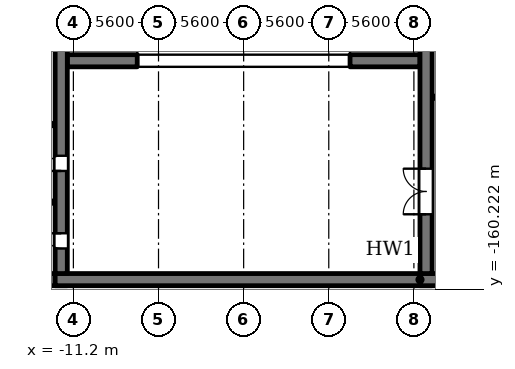
"""IFC4 building model, lengths in metres.
Left out: names, types, materials, properties, quantities, classifications, styles, units other than length and angle.
Written with IfcOpenShell. Run it as: python <this file> out.ifc"""

import sys

from ifc_helpers import new_model, si_unit, direction, frame, frame_2d, origin, place, context, subcontext, project, spatial, rectangle, extrude, element, fill, save


model = new_model("IFC4")
c1 = context("Model", 3, precision=1e-05, world=origin(), true_north=direction((0.0, 1.0)))
c2 = subcontext(c1, "Body", "Model", "MODEL_VIEW")
j1 = project(units=[si_unit("LENGTHUNIT", "METRE"), si_unit("PLANEANGLEUNIT", "RADIAN")], contexts=[c1])
p1 = place(None, origin())
s1 = spatial("IfcSite", under=j1, at=p1, CompositionType="ELEMENT")
p2 = place(p1, origin())
s2 = spatial("IfcBuilding", under=s1, at=p2, CompositionType="ELEMENT")
p3 = place(p2, origin())
s3 = spatial("IfcBuildingStorey", under=s2, at=p3, CompositionType="ELEMENT", Elevation=0.0)
p4 = place(p3, frame((-23.025, -159.6, 0.0), z_axis=(0.0, 0.0, 1.0), x_axis=(1.0, 0.0, 0.0)))
e1 = element("IfcWall", 1, at=p4, inside=s3, PredefinedType="SOLIDWALL", context=c2, shape_type="SweptSolid", body=[
    extrude(rectangle(XDim=11.425, YDim=0.8, at=frame_2d((5.712, 0.0))), origin(), (0.0, 0.0, 1.0), 6.15),
])
p5 = place(p4, frame((1.675, 0.0, 0.9)))
e2 = element("IfcOpeningElement", 2, at=p5, cuts=e1, PredefinedType="OPENING", context=c2, shape_type="SweptSolid", body=[
    extrude(rectangle(XDim=1.8, YDim=1.5, at=frame_2d((0.9, 0.75))), frame((0.0, 0.41, 0.0), z_axis=(0.0, -1.0, 0.0), x_axis=(1.0, 0.0, 0.0)), (0.0, 0.0, 1.0), 0.82),
])
p6 = place(p4, frame((4.675, 0.0, 0.9)))
e3 = element("IfcOpeningElement", 3, at=p6, cuts=e1, PredefinedType="OPENING", context=c2, shape_type="SweptSolid", body=[
    extrude(rectangle(XDim=1.8, YDim=1.5, at=frame_2d((0.9, 0.75))), frame((0.0, 0.41, 0.0), z_axis=(0.0, -1.0, 0.0), x_axis=(1.0, 0.0, 0.0)), (0.0, 0.0, 1.0), 0.82),
])
p7 = place(p4, frame((7.675, 0.0, 0.9)))
e4 = element("IfcOpeningElement", 4, at=p7, cuts=e1, PredefinedType="OPENING", context=c2, shape_type="SweptSolid", body=[
    extrude(rectangle(XDim=1.8, YDim=1.5, at=frame_2d((0.9, 0.75))), frame((0.0, 0.41, 0.0), z_axis=(0.0, -1.0, 0.0), x_axis=(1.0, 0.0, 0.0)), (0.0, 0.0, 1.0), 0.82),
])
p8 = place(p3, frame((-12.4, -159.6, 0.0), z_axis=(0.0, 0.0, 1.0), x_axis=(1.0, 0.0, 0.0)))
e5 = element("IfcWall", 5, at=p8, inside=s3, PredefinedType="SOLIDWALL", context=c2, shape_type="SweptSolid", body=[
    extrude(rectangle(XDim=24.8, YDim=0.8, at=frame_2d((12.4, 0.0))), origin(), (0.0, 0.0, 1.0), 6.5),
])
p9 = place(p3, frame((11.6, -159.6, 0.0), z_axis=(0.0, 0.0, 1.0), x_axis=(1.0, 0.0, 0.0)))
e6 = element("IfcWall", 6, at=p9, inside=s3, PredefinedType="SOLIDWALL", context=c2, shape_type="SweptSolid", body=[
    extrude(rectangle(XDim=18.4, YDim=0.8, at=frame_2d((9.2, 0.0))), origin(), (0.0, 0.0, 1.0), 6.15),
])
p10 = place(p9, frame((6.4, 0.0, 0.0)))
e7 = element("IfcOpeningElement", 7, at=p10, cuts=e6, PredefinedType="OPENING", context=c2, shape_type="SweptSolid", body=[
    extrude(rectangle(XDim=4.0, YDim=4.5, at=frame_2d((2.0, 2.25))), frame((0.0, 0.41, 0.0), z_axis=(0.0, -1.0, 0.0), x_axis=(1.0, 0.0, 0.0)), (0.0, 0.0, 1.0), 0.82),
])
for number, where, z_axis, x_axis in (
    (8, (-22.775, -154.5, 0.0), (0.0, 0.0, 1.0), (1.0, 0.0, 0.0)),
    (9, (-22.775, -149.4, 0.0), (0.0, 0.0, 1.0), (1.0, 0.0, 0.0)),
):
    element("IfcWall", number, at=place(p3, frame(where, z_axis=z_axis, x_axis=x_axis)), inside=s3, PredefinedType="PARTITIONING", context=c2, shape_type="SweptSolid", body=[
        extrude(rectangle(XDim=10.375, YDim=0.15, at=frame_2d((5.188, 0.0))), origin(), (0.0, 0.0, 1.0), 6.15),
    ])
p11 = place(p3, frame((12.4, -147.6, 0.0), z_axis=(0.0, 0.0, 1.0), x_axis=(1.0, 0.0, 0.0)))
e10 = element("IfcWall", 10, at=p11, inside=s3, PredefinedType="PARTITIONING", context=c2, shape_type="SweptSolid", body=[
    extrude(rectangle(XDim=13.35, YDim=0.15, at=frame_2d((6.675, 0.0))), origin(), (0.0, 0.0, 1.0), 6.15),
])
p12 = place(p11, frame((5.1, 0.0, 0.0)))
e11 = element("IfcOpeningElement", 11, at=p12, cuts=e10, PredefinedType="OPENING", context=c2, shape_type="SweptSolid", body=[
    extrude(rectangle(XDim=1.0, YDim=2.1, at=frame_2d((0.5, 1.05))), frame((0.0, 0.085, 0.0), z_axis=(0.0, -1.0, 0.0), x_axis=(1.0, 0.0, 0.0)), (0.0, 0.0, 1.0), 0.17),
])
for number, where, z_axis, x_axis in (
    (12, (-11.6, -145.2, 0.0), (0.0, 0.0, 1.0), (1.0, 0.0, 0.0)),
    (13, (7.0, -145.2, 0.0), (0.0, 0.0, 1.0), (1.0, 0.0, 0.0)),
):
    element("IfcWall", number, at=place(p3, frame(where, z_axis=z_axis, x_axis=x_axis)), inside=s3, PredefinedType="SOLIDWALL", context=c2, shape_type="SweptSolid", body=[
        extrude(rectangle(XDim=4.6, YDim=0.8, at=frame_2d((2.3, 0.0))), origin(), (0.0, 0.0, 1.0), 6.5),
    ])
p13 = place(p3, frame((-12.0, -159.2, 0.0), z_axis=(0.0, 0.0, 1.0), x_axis=(0.0, 1.0, 0.0)))
e14 = element("IfcWall", 14, at=p13, inside=s3, PredefinedType="SOLIDWALL", context=c2, shape_type="SweptSolid", body=[
    extrude(rectangle(XDim=34.125, YDim=0.8, at=frame_2d((17.062, 0.0))), origin(), (0.0, 0.0, 1.0), 6.5),
])
p14 = place(p13, frame((21.6, 0.0, 0.0)))
e15 = element("IfcOpeningElement", 15, at=p14, cuts=e14, PredefinedType="OPENING", context=c2, shape_type="SweptSolid", body=[
    extrude(rectangle(XDim=1.8, YDim=2.2, at=frame_2d((0.9, 1.1))), frame((0.0, 0.41, 0.0), z_axis=(0.0, -1.0, 0.0), x_axis=(1.0, 0.0, 0.0)), (0.0, 0.0, 1.0), 0.82),
])
p15 = place(p13, frame((25.1, 0.0, 0.0)))
e16 = element("IfcOpeningElement", 16, at=p15, cuts=e14, PredefinedType="OPENING", context=c2, shape_type="SweptSolid", body=[
    extrude(rectangle(XDim=1.8, YDim=2.2, at=frame_2d((0.9, 1.1))), frame((0.0, 0.41, 0.0), z_axis=(0.0, -1.0, 0.0), x_axis=(1.0, 0.0, 0.0)), (0.0, 0.0, 1.0), 0.82),
])
p16 = place(p13, frame((6.75, 0.0, 0.0)))
e17 = element("IfcOpeningElement", 17, at=p16, cuts=e14, PredefinedType="OPENING", context=c2, shape_type="SweptSolid", body=[
    extrude(rectangle(XDim=1.0, YDim=2.1, at=frame_2d((0.5, 1.05))), frame((0.0, 0.41, 0.0), z_axis=(0.0, -1.0, 0.0), x_axis=(1.0, 0.0, 0.0)), (0.0, 0.0, 1.0), 0.82),
])
p17 = place(p13, frame((1.65, 0.0, 0.0)))
e18 = element("IfcOpeningElement", 18, at=p17, cuts=e14, PredefinedType="OPENING", context=c2, shape_type="SweptSolid", body=[
    extrude(rectangle(XDim=1.0, YDim=2.1, at=frame_2d((0.5, 1.05))), frame((0.0, 0.41, 0.0), z_axis=(0.0, -1.0, 0.0), x_axis=(1.0, 0.0, 0.0)), (0.0, 0.0, 1.0), 0.82),
])
p18 = place(p3, frame((12.0, -159.2, 0.0), z_axis=(0.0, 0.0, 1.0), x_axis=(0.0, 1.0, 0.0)))
e19 = element("IfcWall", 19, at=p18, inside=s3, PredefinedType="SOLIDWALL", context=c2, shape_type="SweptSolid", body=[
    extrude(rectangle(XDim=34.125, YDim=0.8, at=frame_2d((17.062, 0.0))), origin(), (0.0, 0.0, 1.0), 6.5),
])
p19 = place(p18, frame((21.6, 0.0, 0.0)))
e20 = element("IfcOpeningElement", 20, at=p19, cuts=e19, PredefinedType="OPENING", context=c2, shape_type="SweptSolid", body=[
    extrude(rectangle(XDim=1.8, YDim=2.2, at=frame_2d((0.9, 1.1))), frame((0.0, 0.41, 0.0), z_axis=(0.0, -1.0, 0.0), x_axis=(1.0, 0.0, 0.0)), (0.0, 0.0, 1.0), 0.82),
])
p20 = place(p18, frame((25.1, 0.0, 0.0)))
e21 = element("IfcOpeningElement", 21, at=p20, cuts=e19, PredefinedType="OPENING", context=c2, shape_type="SweptSolid", body=[
    extrude(rectangle(XDim=1.8, YDim=2.2, at=frame_2d((0.9, 1.1))), frame((0.0, 0.41, 0.0), z_axis=(0.0, -1.0, 0.0), x_axis=(1.0, 0.0, 0.0)), (0.0, 0.0, 1.0), 0.82),
])
p21 = place(p18, frame((3.9, 0.0, 0.0)))
e22 = element("IfcOpeningElement", 22, at=p21, cuts=e19, PredefinedType="OPENING", context=c2, shape_type="SweptSolid", body=[
    extrude(rectangle(XDim=3.0, YDim=3.0, at=frame_2d((1.5, 1.5))), frame((0.0, 0.41, 0.0), z_axis=(0.0, -1.0, 0.0), x_axis=(1.0, 0.0, 0.0)), (0.0, 0.0, 1.0), 0.82),
])
p22 = place(p16, origin())
e23 = element("IfcDoor", 23, at=p22, inside=s3, OperationType="SINGLE_SWING_LEFT", PredefinedType="DOOR", context=c2, shape_type="SweptSolid", body=[
    extrude(rectangle(XDim=1.0, YDim=2.1, at=frame_2d((0.5, 1.05))), frame((0.0, 0.025, 0.0), z_axis=(0.0, -1.0, 0.0), x_axis=(1.0, 0.0, 0.0)), (0.0, 0.0, 1.0), 0.05),
])
fill(e17, e23)
p23 = place(p17, origin())
e24 = element("IfcDoor", 24, at=p23, inside=s3, OperationType="SINGLE_SWING_RIGHT", PredefinedType="DOOR", context=c2, shape_type="SweptSolid", body=[
    extrude(rectangle(XDim=1.0, YDim=2.1, at=frame_2d((0.5, 1.05))), frame((0.0, 0.025, 0.0), z_axis=(0.0, -1.0, 0.0), x_axis=(1.0, 0.0, 0.0)), (0.0, 0.0, 1.0), 0.05),
])
fill(e18, e24)
p24 = place(p21, origin())
e25 = element("IfcDoor", 25, at=p24, inside=s3, OperationType="DOUBLE_DOOR_DOUBLE_SWING", PredefinedType="DOOR", context=c2, shape_type="SweptSolid", body=[
    extrude(rectangle(XDim=3.0, YDim=3.0, at=frame_2d((1.5, 1.5))), frame((0.0, 0.025, 0.0), z_axis=(0.0, -1.0, 0.0), x_axis=(1.0, 0.0, 0.0)), (0.0, 0.0, 1.0), 0.05),
])
fill(e22, e25)
save(model, sys.argv[1])
